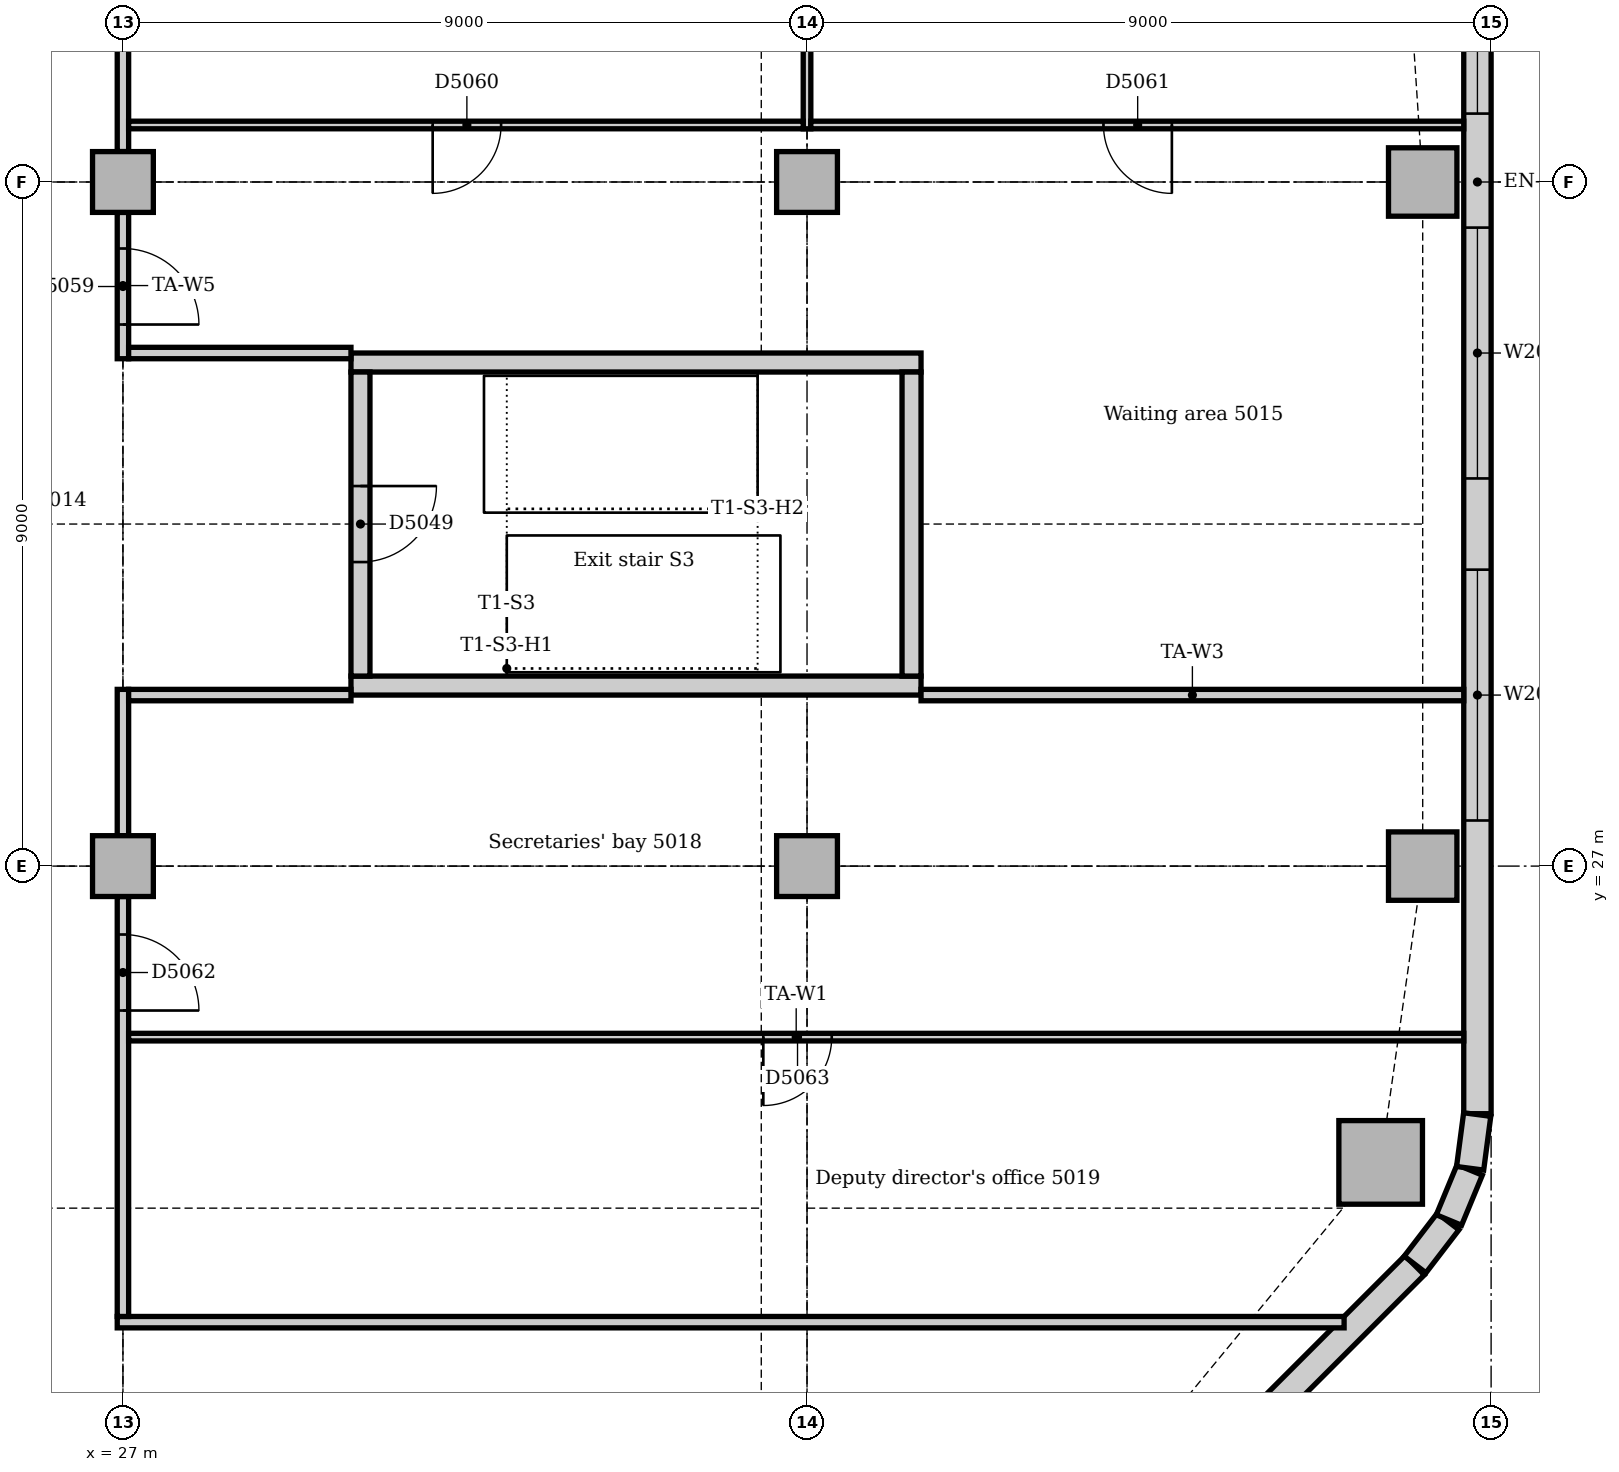
"""IFC4 building model, lengths in metres.
Left out: names, types, materials, properties, quantities, classifications, styles, units other than length and angle.
Written with IfcOpenShell. Run it as: python <this file> out.ifc"""

import sys

from ifc_helpers import new_model, si_unit, direction, frame, frame_2d, origin, origin_2d, place, context, subcontext, project, spatial, rectangle, extrude, element, fill, save


model = new_model("IFC4")
c1 = context("Model", 3, precision=1e-05, world=origin(), true_north=direction((0.0, 1.0)))
c2 = subcontext(c1, "Body", "Model", "MODEL_VIEW")
j1 = project(units=[si_unit("LENGTHUNIT", "METRE"), si_unit("PLANEANGLEUNIT", "RADIAN")], contexts=[c1])
p1 = place(None, origin())
s1 = spatial("IfcSite", under=j1, at=p1, CompositionType="ELEMENT")
p2 = place(p1, origin())
s2 = spatial("IfcBuilding", under=s1, at=p2, CompositionType="ELEMENT")
p3 = place(p2, frame((0.0, 0.0, 210.0)))
s3 = spatial("IfcBuildingStorey", under=s2, at=p3, CompositionType="ELEMENT", Elevation=210.0)
for number, where, z_axis, x_axis in (
    (1, (30.0, 29.375, 0.0), (0.0, 0.0, 1.0), (1.0, 0.0, 0.0)),
    (2, (37.5, 33.625, 0.0), (0.0, 0.0, 1.0), (-1.0, 0.0, 0.0)),
):
    element("IfcWall", number, at=place(p3, frame(where, z_axis=z_axis, x_axis=x_axis)), inside=s3, PredefinedType="SOLIDWALL", context=c2, shape_type="SweptSolid", body=[
        extrude(rectangle(XDim=7.5, YDim=0.25, at=frame_2d((3.75, 0.0))), origin(), (0.0, 0.0, 1.0), 4.0),
    ])
p4 = place(p3, frame((37.375, 29.5, 0.0), z_axis=(0.0, 0.0, 1.0), x_axis=(0.0, 1.0, 0.0)))
e3 = element("IfcWall", 3, at=p4, inside=s3, PredefinedType="SOLIDWALL", context=c2, shape_type="SweptSolid", body=[
    extrude(rectangle(XDim=4.0, YDim=0.25, at=frame_2d((2.0, 0.0))), origin(), (0.0, 0.0, 1.0), 4.0),
])
p5 = place(p3, frame((30.125, 33.5, 0.0), z_axis=(0.0, 0.0, 1.0), x_axis=(0.0, -1.0, 0.0)))
e4 = element("IfcWall", 4, at=p5, inside=s3, PredefinedType="SOLIDWALL", context=c2, shape_type="SweptSolid", body=[
    extrude(rectangle(XDim=4.0, YDim=0.25, at=frame_2d((2.0, 0.0))), origin(), (0.0, 0.0, 1.0), 4.0),
])
p6 = place(p5, frame((1.5, 0.0, 0.0)))
e5 = element("IfcOpeningElement", 5, at=p6, cuts=e4, PredefinedType="OPENING", context=c2, shape_type="SweptSolid", body=[
    extrude(rectangle(XDim=1.0, YDim=2.1, at=frame_2d((0.5, 1.05))), frame((0.0, 0.135, 0.0), z_axis=(0.0, -1.0, 0.0), x_axis=(1.0, 0.0, 0.0)), (0.0, 0.0, 1.0), 0.27),
])
p7 = place(p3, frame((43.547, 23.102, 0.0), z_axis=(0.0, 0.0, 1.0), x_axis=(1.0, 0.0, 0.0)))
e6 = element("IfcColumn", 6, at=p7, inside=s3, PredefinedType="COLUMN", context=c2, shape_type="SweptSolid", body=[
    extrude(rectangle(XDim=1.1, YDim=1.1, at=origin_2d()), origin(), (0.0, 0.0, 1.0), 3.85),
])
for number, where, z_axis, x_axis in (
    (7, (44.1, 27.0, 0.0), (0.0, 0.0, 1.0), (1.0, 0.0, 0.0)),
    (8, (44.1, 36.0, 0.0), (0.0, 0.0, 1.0), (1.0, 0.0, 0.0)),
):
    element("IfcColumn", number, at=place(p3, frame(where, z_axis=z_axis, x_axis=x_axis)), inside=s3, PredefinedType="COLUMN", context=c2, shape_type="SweptSolid", body=[
        extrude(rectangle(XDim=0.9, YDim=0.9, at=origin_2d()), origin(), (0.0, 0.0, 1.0), 3.85),
    ])
for number, where, z_axis, x_axis in (
    (9, (27.0, 27.0, 0.0), (0.0, 0.0, 1.0), (1.0, 0.0, 0.0)),
    (10, (27.0, 36.0, 0.0), (0.0, 0.0, 1.0), (1.0, 0.0, 0.0)),
    (11, (36.0, 27.0, 0.0), (0.0, 0.0, 1.0), (1.0, 0.0, 0.0)),
    (12, (36.0, 36.0, 0.0), (0.0, 0.0, 1.0), (1.0, 0.0, 0.0)),
):
    element("IfcColumn", number, at=place(p3, frame(where, z_axis=z_axis, x_axis=x_axis)), inside=s3, PredefinedType="COLUMN", context=c2, shape_type="SweptSolid", body=[
        extrude(rectangle(XDim=0.8, YDim=0.8, at=origin_2d()), origin(), (0.0, 0.0, 1.0), 3.85),
    ])
p8 = place(p3, frame((36.751, 14.506, 0.0), z_axis=(0.0, 0.0, 1.0), x_axis=(0.707106781187, 0.707106781187, 0.0)))
e13 = element("IfcWall", 13, at=p8, inside=s3, PredefinedType="STANDARD", context=c2, shape_type="SweptSolid", body=[
    extrude(rectangle(XDim=10.243, YDim=0.36, at=frame_2d((5.121, 0.0))), origin(), (0.0, 0.0, 1.0), 3.85),
])
p9 = place(p8, frame((5.021, 0.0, 0.9)))
e14 = element("IfcOpeningElement", 14, at=p9, cuts=e13, PredefinedType="OPENING", context=c2, shape_type="SweptSolid", body=[
    extrude(rectangle(XDim=1.8, YDim=1.6, at=frame_2d((0.9, 0.8))), frame((0.0, 0.19, 0.0), z_axis=(0.0, -1.0, 0.0), x_axis=(1.0, 0.0, 0.0)), (0.0, 0.0, 1.0), 0.38),
])
p10 = place(p3, frame((44.82, 23.743, 0.0), z_axis=(0.0, 0.0, 1.0), x_axis=(0.0, 1.0, 0.0)))
e15 = element("IfcWall", 15, at=p10, inside=s3, PredefinedType="STANDARD", context=c2, shape_type="SweptSolid", body=[
    extrude(rectangle(XDim=24.515, YDim=0.36, at=frame_2d((12.257, 0.0))), origin(), (0.0, 0.0, 1.0), 3.85),
])
p11 = place(p10, frame((3.857, 0.0, 0.9)))
e16 = element("IfcOpeningElement", 16, at=p11, cuts=e15, PredefinedType="OPENING", context=c2, shape_type="SweptSolid", body=[
    extrude(rectangle(XDim=3.3, YDim=1.6, at=frame_2d((1.65, 0.8))), frame((0.0, 0.19, 0.0), z_axis=(0.0, -1.0, 0.0), x_axis=(1.0, 0.0, 0.0)), (0.0, 0.0, 1.0), 0.38),
])
p12 = place(p10, frame((8.357, 0.0, 0.9)))
e17 = element("IfcOpeningElement", 17, at=p12, cuts=e15, PredefinedType="OPENING", context=c2, shape_type="SweptSolid", body=[
    extrude(rectangle(XDim=3.3, YDim=1.6, at=frame_2d((1.65, 0.8))), frame((0.0, 0.19, 0.0), z_axis=(0.0, -1.0, 0.0), x_axis=(1.0, 0.0, 0.0)), (0.0, 0.0, 1.0), 0.38),
])
p13 = place(p10, frame((13.157, 0.0, 0.9)))
e18 = element("IfcOpeningElement", 18, at=p13, cuts=e15, PredefinedType="OPENING", context=c2, shape_type="SweptSolid", body=[
    extrude(rectangle(XDim=3.3, YDim=1.6, at=frame_2d((1.65, 0.8))), frame((0.0, 0.19, 0.0), z_axis=(0.0, -1.0, 0.0), x_axis=(1.0, 0.0, 0.0)), (0.0, 0.0, 1.0), 0.38),
])
p14 = place(p10, frame((17.357, 0.0, 0.9)))
e19 = element("IfcOpeningElement", 19, at=p14, cuts=e15, PredefinedType="OPENING", context=c2, shape_type="SweptSolid", body=[
    extrude(rectangle(XDim=3.3, YDim=1.6, at=frame_2d((1.65, 0.8))), frame((0.0, 0.19, 0.0), z_axis=(0.0, -1.0, 0.0), x_axis=(1.0, 0.0, 0.0)), (0.0, 0.0, 1.0), 0.38),
])
p15 = place(p3, frame((44.0, 21.759, 0.0), z_axis=(0.0, 0.0, 1.0), x_axis=(0.608802368033, 0.793321924995, 0.0)))
e20 = element("IfcWall", 20, at=p15, inside=s3, PredefinedType="STANDARD", context=c2, shape_type="SweptSolid", body=[
    extrude(rectangle(XDim=0.713, YDim=0.36, at=frame_2d((0.357, 0.0))), origin(), (0.0, 0.0, 1.0), 3.85),
])
for number, where, z_axis, x_axis in (
    (21, (44.445, 22.344, 0.0), (0.0, 0.0, 1.0), (0.383, 0.924, 0.0)),
    (22, (44.724, 23.024, 0.0), (0.0, 0.0, 1.0), (0.131, 0.991, 0.0)),
):
    element("IfcWall", number, at=place(p3, frame(where, z_axis=z_axis, x_axis=x_axis)), inside=s3, PredefinedType="STANDARD", context=c2, shape_type="SweptSolid", body=[
        extrude(rectangle(XDim=0.713, YDim=0.36, at=frame_2d((0.356, 0.0))), origin(), (0.0, 0.0, 1.0), 3.85),
    ])
p16 = place(p3, frame((26.925, 21.0, 0.0), z_axis=(0.0, 0.0, 1.0), x_axis=(1.0, 0.0, 0.0)))
e23 = element("IfcWall", 23, at=p16, inside=s3, PredefinedType="PARTITIONING", context=c2, shape_type="SweptSolid", body=[
    extrude(rectangle(XDim=16.141, YDim=0.15, at=frame_2d((8.07, 0.0))), origin(), (0.0, 0.0, 1.0), 3.85),
])
p17 = place(p3, frame((27.0, 33.675, 0.0), z_axis=(0.0, 0.0, 1.0), x_axis=(0.0, 1.0, 0.0)))
e24 = element("IfcWall", 24, at=p17, inside=s3, PredefinedType="PARTITIONING", context=c2, shape_type="SweptSolid", body=[
    extrude(rectangle(XDim=1.925, YDim=0.15, at=frame_2d((0.963, 0.0))), origin(), (0.0, 0.0, 1.0), 3.35),
])
p18 = place(p17, frame((0.45, 0.0, 0.0)))
e25 = element("IfcOpeningElement", 25, at=p18, cuts=e24, PredefinedType="OPENING", context=c2, shape_type="SweptSolid", body=[
    extrude(rectangle(XDim=1.0, YDim=2.1, at=frame_2d((0.5, 1.05))), frame((0.0, 0.085, 0.0), z_axis=(0.0, -1.0, 0.0), x_axis=(1.0, 0.0, 0.0)), (0.0, 0.0, 1.0), 0.17),
])
p19 = place(p3, frame((27.0, 36.4, 0.0), z_axis=(0.0, 0.0, 1.0), x_axis=(0.0, 1.0, 0.0)))
e26 = element("IfcWall", 26, at=p19, inside=s3, PredefinedType="PARTITIONING", context=c2, shape_type="SweptSolid", body=[
    extrude(rectangle(XDim=7.3, YDim=0.15, at=frame_2d((3.65, 0.0))), origin(), (0.0, 0.0, 1.0), 3.35),
])
p20 = place(p3, frame((27.0, 21.075, 0.0), z_axis=(0.0, 0.0, 1.0), x_axis=(0.0, 1.0, 0.0)))
e27 = element("IfcWall", 27, at=p20, inside=s3, PredefinedType="PARTITIONING", context=c2, shape_type="SweptSolid", body=[
    extrude(rectangle(XDim=5.525, YDim=0.15, at=frame_2d((2.763, 0.0))), origin(), (0.0, 0.0, 1.0), 3.35),
])
p21 = place(p20, frame((4.025, 0.0, 0.0)))
e28 = element("IfcOpeningElement", 28, at=p21, cuts=e27, PredefinedType="OPENING", context=c2, shape_type="SweptSolid", body=[
    extrude(rectangle(XDim=1.0, YDim=2.1, at=frame_2d((0.5, 1.05))), frame((0.0, 0.085, 0.0), z_axis=(0.0, -1.0, 0.0), x_axis=(1.0, 0.0, 0.0)), (0.0, 0.0, 1.0), 0.17),
])
p22 = place(p3, frame((27.0, 27.4, 0.0), z_axis=(0.0, 0.0, 1.0), x_axis=(0.0, 1.0, 0.0)))
e29 = element("IfcWall", 29, at=p22, inside=s3, PredefinedType="PARTITIONING", context=c2, shape_type="SweptSolid", body=[
    extrude(rectangle(XDim=1.925, YDim=0.15, at=frame_2d((0.963, 0.0))), origin(), (0.0, 0.0, 1.0), 3.35),
])
for number, where, z_axis, x_axis in (
    (30, (27.075, 29.25, 0.0), (0.0, 0.0, 1.0), (1.0, 0.0, 0.0)),
    (31, (27.075, 33.75, 0.0), (0.0, 0.0, 1.0), (1.0, 0.0, 0.0)),
):
    element("IfcWall", number, at=place(p3, frame(where, z_axis=z_axis, x_axis=x_axis)), inside=s3, PredefinedType="PARTITIONING", context=c2, shape_type="SweptSolid", body=[
        extrude(rectangle(XDim=2.925, YDim=0.15, at=frame_2d((1.462, 0.0))), origin(), (0.0, 0.0, 1.0), 3.85),
    ])
p23 = place(p3, frame((37.5, 29.25, 0.0), z_axis=(0.0, 0.0, 1.0), x_axis=(1.0, 0.0, 0.0)))
e32 = element("IfcWall", 32, at=p23, inside=s3, PredefinedType="PARTITIONING", context=c2, shape_type="SweptSolid", body=[
    extrude(rectangle(XDim=7.14, YDim=0.15, at=frame_2d((3.57, 0.0))), origin(), (0.0, 0.0, 1.0), 3.85),
])
p24 = place(p3, frame((36.0, 36.7, 0.0), z_axis=(0.0, 0.0, 1.0), x_axis=(0.0, 1.0, 0.0)))
e33 = element("IfcWall", 33, at=p24, inside=s3, PredefinedType="PARTITIONING", context=c2, shape_type="SweptSolid", body=[
    extrude(rectangle(XDim=7.0, YDim=0.1, at=frame_2d((3.5, 0.0))), origin(), (0.0, 0.0, 1.0), 3.35),
])
p25 = place(p3, frame((27.075, 24.75, 0.0), z_axis=(0.0, 0.0, 1.0), x_axis=(1.0, 0.0, 0.0)))
e34 = element("IfcWall", 34, at=p25, inside=s3, PredefinedType="PARTITIONING", context=c2, shape_type="SweptSolid", body=[
    extrude(rectangle(XDim=17.565, YDim=0.1, at=frame_2d((8.783, 0.0))), origin(), (0.0, 0.0, 1.0), 3.85),
])
p26 = place(p25, frame((8.35, 0.0, 0.0)))
e35 = element("IfcOpeningElement", 35, at=p26, cuts=e34, PredefinedType="OPENING", context=c2, shape_type="SweptSolid", body=[
    extrude(rectangle(XDim=0.9, YDim=2.1, at=frame_2d((0.45, 1.05))), frame((0.0, 0.06, 0.0), z_axis=(0.0, -1.0, 0.0), x_axis=(1.0, 0.0, 0.0)), (0.0, 0.0, 1.0), 0.12),
])
p27 = place(p3, frame((27.075, 36.75, 0.0), z_axis=(0.0, 0.0, 1.0), x_axis=(1.0, 0.0, 0.0)))
e36 = element("IfcWall", 36, at=p27, inside=s3, PredefinedType="PARTITIONING", context=c2, shape_type="SweptSolid", body=[
    extrude(rectangle(XDim=8.875, YDim=0.1, at=frame_2d((4.438, 0.0))), origin(), (0.0, 0.0, 1.0), 3.85),
])
p28 = place(p27, frame((4.0, 0.0, 0.0)))
e37 = element("IfcOpeningElement", 37, at=p28, cuts=e36, PredefinedType="OPENING", context=c2, shape_type="SweptSolid", body=[
    extrude(rectangle(XDim=0.9, YDim=2.1, at=frame_2d((0.45, 1.05))), frame((0.0, 0.06, 0.0), z_axis=(0.0, -1.0, 0.0), x_axis=(1.0, 0.0, 0.0)), (0.0, 0.0, 1.0), 0.12),
])
p29 = place(p3, frame((36.05, 36.75, 0.0), z_axis=(0.0, 0.0, 1.0), x_axis=(1.0, 0.0, 0.0)))
e38 = element("IfcWall", 38, at=p29, inside=s3, PredefinedType="PARTITIONING", context=c2, shape_type="SweptSolid", body=[
    extrude(rectangle(XDim=8.59, YDim=0.1, at=frame_2d((4.295, 0.0))), origin(), (0.0, 0.0, 1.0), 3.85),
])
p30 = place(p29, frame((3.85, 0.0, 0.0)))
e39 = element("IfcOpeningElement", 39, at=p30, cuts=e38, PredefinedType="OPENING", context=c2, shape_type="SweptSolid", body=[
    extrude(rectangle(XDim=0.9, YDim=2.1, at=frame_2d((0.45, 1.05))), frame((0.0, 0.06, 0.0), z_axis=(0.0, -1.0, 0.0), x_axis=(1.0, 0.0, 0.0)), (0.0, 0.0, 1.0), 0.12),
])
p31 = place(p11, origin())
e40 = element("IfcWindow", 40, at=p31, inside=s3, PartitioningType="SINGLE_PANEL", PredefinedType="WINDOW", context=c2, shape_type="SweptSolid", body=[
    extrude(rectangle(XDim=3.3, YDim=1.6, at=frame_2d((1.65, 0.8))), frame((0.0, 0.13, 0.0), z_axis=(0.0, -1.0, 0.0), x_axis=(1.0, 0.0, 0.0)), (0.0, 0.0, 1.0), 0.06),
])
fill(e16, e40)
p32 = place(p12, origin())
e41 = element("IfcWindow", 41, at=p32, inside=s3, PartitioningType="SINGLE_PANEL", PredefinedType="WINDOW", context=c2, shape_type="SweptSolid", body=[
    extrude(rectangle(XDim=3.3, YDim=1.6, at=frame_2d((1.65, 0.8))), frame((0.0, 0.13, 0.0), z_axis=(0.0, -1.0, 0.0), x_axis=(1.0, 0.0, 0.0)), (0.0, 0.0, 1.0), 0.06),
])
fill(e17, e41)
p33 = place(p13, origin())
e42 = element("IfcWindow", 42, at=p33, inside=s3, PartitioningType="SINGLE_PANEL", PredefinedType="WINDOW", context=c2, shape_type="SweptSolid", body=[
    extrude(rectangle(XDim=3.3, YDim=1.6, at=frame_2d((1.65, 0.8))), frame((0.0, 0.13, 0.0), z_axis=(0.0, -1.0, 0.0), x_axis=(1.0, 0.0, 0.0)), (0.0, 0.0, 1.0), 0.06),
])
fill(e18, e42)
p34 = place(p6, origin())
e43 = element("IfcDoor", 43, at=p34, inside=s3, OperationType="SINGLE_SWING_LEFT", PredefinedType="DOOR", context=c2, shape_type="SweptSolid", body=[
    extrude(rectangle(XDim=1.0, YDim=2.1, at=frame_2d((0.5, 1.05))), frame((0.0, 0.025, 0.0), z_axis=(0.0, -1.0, 0.0), x_axis=(1.0, 0.0, 0.0)), (0.0, 0.0, 1.0), 0.05),
])
fill(e5, e43)
p35 = place(p18, frame((1.0, 0.0, 0.0), z_axis=(0.0, 0.0, 1.0), x_axis=(-1.0, 0.0, 0.0)))
e44 = element("IfcDoor", 44, at=p35, inside=s3, OperationType="SINGLE_SWING_RIGHT", PredefinedType="DOOR", context=c2, shape_type="SweptSolid", body=[
    extrude(rectangle(XDim=1.0, YDim=2.1, at=frame_2d((0.5, 1.05))), frame((0.0, 0.025, 0.0), z_axis=(0.0, -1.0, 0.0), x_axis=(1.0, 0.0, 0.0)), (0.0, 0.0, 1.0), 0.05),
])
fill(e25, e44)
p36 = place(p28, frame((0.9, 0.0, 0.0), z_axis=(0.0, 0.0, 1.0), x_axis=(-1.0, 0.0, 0.0)))
e45 = element("IfcDoor", 45, at=p36, inside=s3, OperationType="SINGLE_SWING_RIGHT", PredefinedType="DOOR", context=c2, shape_type="SweptSolid", body=[
    extrude(rectangle(XDim=0.9, YDim=2.1, at=frame_2d((0.45, 1.05))), frame((0.0, 0.025, 0.0), z_axis=(0.0, -1.0, 0.0), x_axis=(1.0, 0.0, 0.0)), (0.0, 0.0, 1.0), 0.05),
])
fill(e37, e45)
p37 = place(p30, frame((0.9, 0.0, 0.0), z_axis=(0.0, 0.0, 1.0), x_axis=(-1.0, 0.0, 0.0)))
e46 = element("IfcDoor", 46, at=p37, inside=s3, OperationType="SINGLE_SWING_LEFT", PredefinedType="DOOR", context=c2, shape_type="SweptSolid", body=[
    extrude(rectangle(XDim=0.9, YDim=2.1, at=frame_2d((0.45, 1.05))), frame((0.0, 0.025, 0.0), z_axis=(0.0, -1.0, 0.0), x_axis=(1.0, 0.0, 0.0)), (0.0, 0.0, 1.0), 0.05),
])
fill(e39, e46)
p38 = place(p21, frame((1.0, 0.0, 0.0), z_axis=(0.0, 0.0, 1.0), x_axis=(-1.0, 0.0, 0.0)))
e47 = element("IfcDoor", 47, at=p38, inside=s3, OperationType="SINGLE_SWING_RIGHT", PredefinedType="DOOR", context=c2, shape_type="SweptSolid", body=[
    extrude(rectangle(XDim=1.0, YDim=2.1, at=frame_2d((0.5, 1.05))), frame((0.0, 0.025, 0.0), z_axis=(0.0, -1.0, 0.0), x_axis=(1.0, 0.0, 0.0)), (0.0, 0.0, 1.0), 0.05),
])
fill(e28, e47)
p39 = place(p26, frame((0.9, 0.0, 0.0), z_axis=(0.0, 0.0, 1.0), x_axis=(-1.0, 0.0, 0.0)))
e48 = element("IfcDoor", 48, at=p39, inside=s3, OperationType="SINGLE_SWING_RIGHT", PredefinedType="DOOR", context=c2, shape_type="SweptSolid", body=[
    extrude(rectangle(XDim=0.9, YDim=2.1, at=frame_2d((0.45, 1.05))), frame((0.0, 0.025, 0.0), z_axis=(0.0, -1.0, 0.0), x_axis=(1.0, 0.0, 0.0)), (0.0, 0.0, 1.0), 0.05),
])
fill(e35, e48)
save(model, sys.argv[1])
